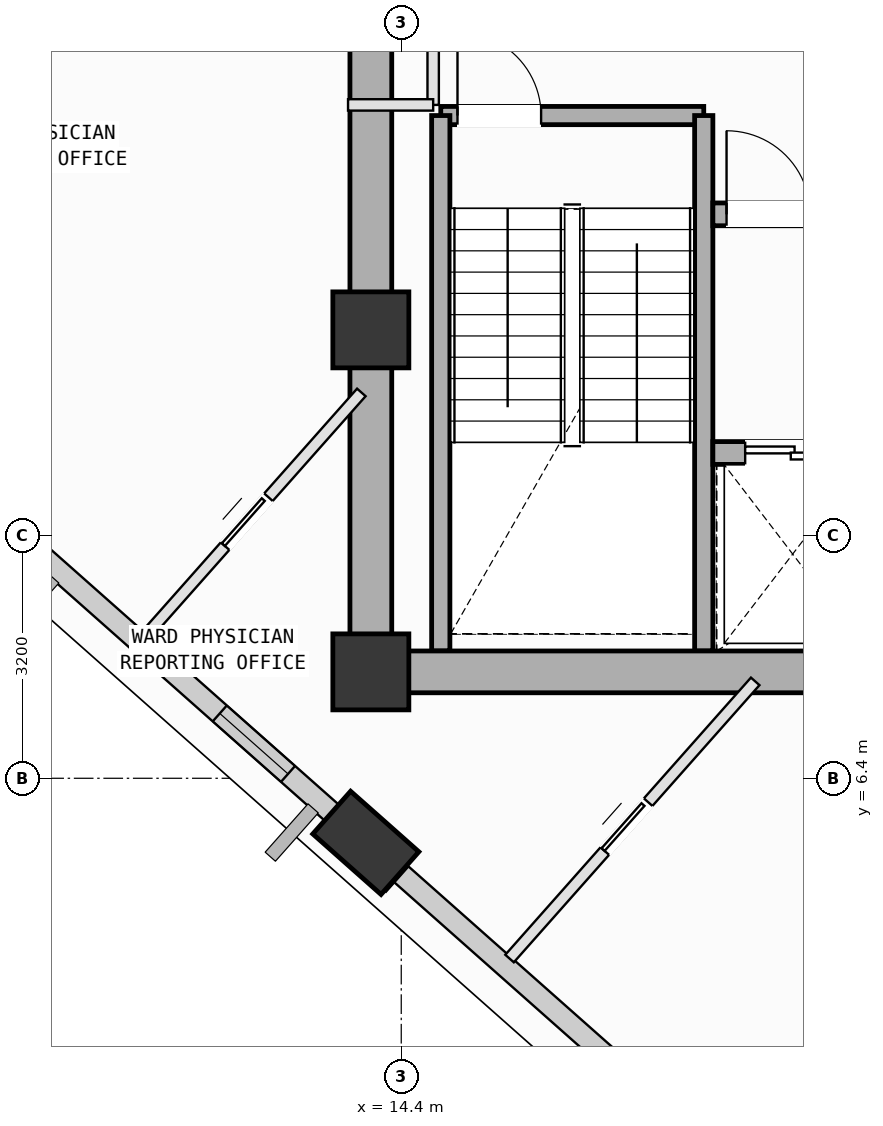
"""IFC4 building model, lengths in metres.
Left out: names, types, materials, properties, quantities, classifications, styles, units other than length and angle.
Written with IfcOpenShell. Run it as: python <this file> out.ifc"""

import sys

from ifc_helpers import new_model, si_unit, direction, frame, frame_2d, origin, origin_2d, place, context, subcontext, project, spatial, rectangle, extrude, element, fill, save


model = new_model("IFC4")
c1 = context("Model", 3, precision=1e-05, world=origin(), true_north=direction((0.0, 1.0)))
c2 = subcontext(c1, "Body", "Model", "MODEL_VIEW")
j1 = project(units=[si_unit("LENGTHUNIT", "METRE"), si_unit("PLANEANGLEUNIT", "RADIAN")], contexts=[c1])
p1 = place(None, origin())
s1 = spatial("IfcSite", under=j1, at=p1, CompositionType="ELEMENT")
p2 = place(p1, origin())
s2 = spatial("IfcBuilding", under=s1, at=p2, CompositionType="ELEMENT")
p3 = place(p2, frame((0.0, 0.0, 231.2)))
s3 = spatial("IfcBuildingStorey", under=s2, at=p3, CompositionType="ELEMENT", Elevation=231.2)
for number, where, z_axis, x_axis in (
    (1, (14.0, 7.8, 0.0), (0.0, 0.0, 1.0), (1.0, 0.0, 0.0)),
    (2, (14.0, 12.3, 0.0), (0.0, 0.0, 1.0), (1.0, 0.0, 0.0)),
):
    element("IfcColumn", number, at=place(p3, frame(where, z_axis=z_axis, x_axis=x_axis)), inside=s3, PredefinedType="COLUMN", context=c2, shape_type="SweptSolid", body=[
        extrude(rectangle(XDim=1.0, YDim=1.0, at=origin_2d()), origin(), (0.0, 0.0, 1.0), 4.0),
    ])
p4 = place(p3, frame((8.957, 9.961, 0.002), z_axis=(0.061875011335, -0.100880533187, 0.992972608382), x_axis=(-0.982288349471, 0.170141650321, 0.078494696129)))
e3 = element("IfcColumn", 3, at=p4, inside=s3, PredefinedType="COLUMN", context=c2, shape_type="SweptSolid", body=[
    extrude(rectangle(XDim=1.2, YDim=0.75, at=origin_2d()), origin(), (0.0, 0.0, 1.0), 4.025),
])
p5 = place(p3, frame((13.934, 5.55, 0.002), z_axis=(0.079998727343, -0.080362909713, 0.993550203244), x_axis=(-0.995303672249, -0.060942288648, 0.075210620677)))
e4 = element("IfcColumn", 4, at=p5, inside=s3, PredefinedType="COLUMN", context=c2, shape_type="SweptSolid", body=[
    extrude(rectangle(XDim=1.2, YDim=0.75, at=origin_2d()), origin(), (0.0, 0.0, 1.0), 4.022),
])
p6 = place(p3, frame((13.807, 5.663, 0.0), z_axis=(0.0, 0.0, 1.0), x_axis=(-0.74835774787, 0.663295319751, 0.0)))
e5 = element("IfcWall", 5, at=p6, inside=s3, PredefinedType="SOLIDWALL", context=c2, shape_type="SweptSolid", body=[
    extrude(rectangle(XDim=5.861, YDim=0.28, at=frame_2d((2.93, 0.0))), origin(), (0.0, 0.0, 1.0), 3.165),
])
p7 = place(p6, frame((1.198, 0.0, 0.75)))
e6 = element("IfcOpeningElement", 6, at=p7, cuts=e5, PredefinedType="OPENING", context=c2, shape_type="SweptSolid", body=[
    extrude(rectangle(XDim=1.2, YDim=1.75, at=frame_2d((0.6, 0.875))), frame((0.0, 0.15, 0.0), z_axis=(0.0, -1.0, 0.0), x_axis=(1.0, 0.0, 0.0)), (0.0, 0.0, 1.0), 0.3),
])
p8 = place(p3, frame((20.058, 0.123, 0.0), z_axis=(0.0, 0.0, 1.0), x_axis=(-0.748365523049, 0.663286547362, 0.0)))
e7 = element("IfcWall", 7, at=p8, inside=s3, PredefinedType="SOLIDWALL", context=c2, shape_type="SweptSolid", body=[
    extrude(rectangle(XDim=7.558, YDim=0.28, at=frame_2d((3.779, 0.0))), origin(), (0.0, 0.0, 1.0), 3.265),
])
p9 = place(p8, frame((1.975, 0.0, 0.75)))
e8 = element("IfcOpeningElement", 8, at=p9, cuts=e7, PredefinedType="OPENING", context=c2, shape_type="SweptSolid", body=[
    extrude(rectangle(XDim=1.6, YDim=1.95, at=frame_2d((0.8, 0.975))), frame((0.0, 0.15, 0.0), z_axis=(0.0, -1.0, 0.0), x_axis=(1.0, 0.0, 0.0)), (0.0, 0.0, 1.0), 0.3),
])
p10 = place(p3, frame((14.92, 15.12, 0.0), z_axis=(0.0, 0.0, 1.0), x_axis=(1.0, 0.0, 0.0)))
e9 = element("IfcWall", 9, at=p10, inside=s3, PredefinedType="SOLIDWALL", context=c2, shape_type="SweptSolid", body=[
    extrude(rectangle(XDim=3.46, YDim=0.24, at=frame_2d((1.73, 0.0))), origin(), (0.0, 0.0, 1.0), 3.78),
])
p11 = place(p10, frame((0.22, 0.0, 0.0)))
e10 = element("IfcOpeningElement", 10, at=p11, cuts=e9, PredefinedType="OPENING", context=c2, shape_type="SweptSolid", body=[
    extrude(rectangle(XDim=1.1, YDim=2.15, at=frame_2d((0.55, 1.075))), frame((0.0, 0.13, 0.0), z_axis=(0.0, -1.0, 0.0), x_axis=(1.0, 0.0, 0.0)), (0.0, 0.0, 1.0), 0.26),
])
for number, where, z_axis, x_axis in (
    (11, (18.38, 15.12, 0.0), (0.0, 0.0, 1.0), (0.0, -1.0, 0.0)),
    (12, (14.92, 8.075, 0.0), (0.0, 0.0, 1.0), (0.0, 1.0, 0.0)),
):
    element("IfcWall", number, at=place(p3, frame(where, z_axis=z_axis, x_axis=x_axis)), inside=s3, PredefinedType="SOLIDWALL", context=c2, shape_type="SweptSolid", body=[
        extrude(rectangle(XDim=7.045, YDim=0.24, at=frame_2d((3.522, 0.0))), origin(), (0.0, 0.0, 1.0), 3.78),
    ])
p12 = place(p3, frame((14.0, 7.8, 0.0), z_axis=(0.0, 0.0, 1.0), x_axis=(1.0, 0.0, 0.0)))
e13 = element("IfcWall", 13, at=p12, inside=s3, PredefinedType="SHEAR", context=c2, shape_type="SweptSolid", body=[
    extrude(rectangle(XDim=10.8, YDim=0.55, at=frame_2d((5.4, 0.0))), origin(), (0.0, 0.0, 1.0), 3.78),
])
p13 = place(p3, frame((14.0, 16.8, 0.0), z_axis=(0.0, 0.0, 1.0), x_axis=(0.0, -1.0, 0.0)))
e14 = element("IfcWall", 14, at=p13, inside=s3, PredefinedType="SHEAR", context=c2, shape_type="SweptSolid", body=[
    extrude(rectangle(XDim=9.0, YDim=0.55, at=frame_2d((4.5, 0.0))), origin(), (0.0, 0.0, 1.0), 3.78),
])
p14 = place(p3, frame((18.5, 10.68, 0.0), z_axis=(0.0, 0.0, 1.0), x_axis=(1.0, 0.0, 0.0)))
e15 = element("IfcWall", 15, at=p14, inside=s3, PredefinedType="SOLIDWALL", context=c2, shape_type="SweptSolid", body=[
    extrude(rectangle(XDim=5.3, YDim=0.3, at=frame_2d((2.65, 0.0))), origin(), (0.0, 0.0, 1.0), 3.78),
])
p15 = place(p14, frame((4.22, 0.0, 0.0)))
e16 = element("IfcOpeningElement", 16, at=p15, cuts=e15, PredefinedType="OPENING", context=c2, shape_type="SweptSolid", body=[
    extrude(rectangle(XDim=0.86, YDim=2.06, at=frame_2d((0.43, 1.03))), frame((0.0, 0.16, 0.0), z_axis=(0.0, -1.0, 0.0), x_axis=(1.0, 0.0, 0.0)), (0.0, 0.0, 1.0), 0.32),
])
p16 = place(p14, frame((0.425, 0.0, 0.0)))
e17 = element("IfcOpeningElement", 17, at=p16, cuts=e15, PredefinedType="OPENING", context=c2, shape_type="SweptSolid", body=[
    extrude(rectangle(XDim=1.25, YDim=2.18, at=frame_2d((0.625, 1.09))), frame((0.0, 0.16, 0.0), z_axis=(0.0, -1.0, 0.0), x_axis=(1.0, 0.0, 0.0)), (0.0, 0.0, 1.0), 0.32),
])
p17 = place(p14, frame((2.525, 0.0, 0.0)))
e18 = element("IfcOpeningElement", 18, at=p17, cuts=e15, PredefinedType="OPENING", context=c2, shape_type="SweptSolid", body=[
    extrude(rectangle(XDim=1.25, YDim=2.18, at=frame_2d((0.625, 1.09))), frame((0.0, 0.16, 0.0), z_axis=(0.0, -1.0, 0.0), x_axis=(1.0, 0.0, 0.0)), (0.0, 0.0, 1.0), 0.32),
])
p18 = place(p3, frame((18.5, 13.82, 0.0), z_axis=(0.0, 0.0, 1.0), x_axis=(1.0, 0.0, 0.0)))
e19 = element("IfcWall", 19, at=p18, inside=s3, PredefinedType="SOLIDWALL", context=c2, shape_type="SweptSolid", body=[
    extrude(rectangle(XDim=5.3, YDim=0.3, at=frame_2d((2.65, 0.0))), origin(), (0.0, 0.0, 1.0), 3.78),
])
p19 = place(p18, frame((0.18, 0.0, 0.0)))
e20 = element("IfcOpeningElement", 20, at=p19, cuts=e19, PredefinedType="OPENING", context=c2, shape_type="SweptSolid", body=[
    extrude(rectangle(XDim=1.1, YDim=2.15, at=frame_2d((0.55, 1.075))), frame((0.0, 0.16, 0.0), z_axis=(0.0, -1.0, 0.0), x_axis=(1.0, 0.0, 0.0)), (0.0, 0.0, 1.0), 0.32),
])
p20 = place(p3, frame((15.825, 4.028, 0.0), z_axis=(0.0, 0.0, 1.0), x_axis=(0.663237367069, 0.748409109327, 0.0)))
e21 = element("IfcWall", 21, at=p20, inside=s3, PredefinedType="PARTITIONING", context=c2, shape_type="SweptSolid", body=[
    extrude(rectangle(XDim=4.873, YDim=0.15, at=frame_2d((2.437, 0.0))), origin(), (0.0, 0.0, 1.0), 3.78),
])
p21 = place(p20, frame((1.89, 0.0, 0.0)))
e22 = element("IfcOpeningElement", 22, at=p21, cuts=e21, PredefinedType="OPENING", context=c2, shape_type="SweptSolid", body=[
    extrude(rectangle(XDim=0.86, YDim=2.06, at=frame_2d((0.43, 1.03))), frame((0.0, 0.085, 0.0), z_axis=(0.0, -1.0, 0.0), x_axis=(1.0, 0.0, 0.0)), (0.0, 0.0, 1.0), 0.17),
])
p22 = place(p3, frame((14.249, 4.964, 0.0), z_axis=(0.0, 0.0, 1.0), x_axis=(-0.748662236722, 0.662951623655, 0.0)))
e23 = element("IfcWall", 23, at=p22, inside=s3, PredefinedType="PARTITIONING", context=c2, shape_type="SweptSolid", body=[
    extrude(rectangle(XDim=0.795, YDim=0.15, at=frame_2d((0.397, 0.0))), origin(), (0.0, 0.0, 1.0), 3.265),
])
p23 = place(p3, frame((11.035, 8.273, 0.0), z_axis=(0.0, 0.0, 1.0), x_axis=(0.663319126157, 0.748336646754, 0.0)))
e24 = element("IfcWall", 24, at=p23, inside=s3, PredefinedType="PARTITIONING", context=c2, shape_type="SweptSolid", body=[
    extrude(rectangle(XDim=4.282, YDim=0.15, at=frame_2d((2.141, 0.0))), origin(), (0.0, 0.0, 1.0), 3.78),
])
p24 = place(p23, frame((1.579, 0.0, 0.0)))
e25 = element("IfcOpeningElement", 25, at=p24, cuts=e24, PredefinedType="OPENING", context=c2, shape_type="SweptSolid", body=[
    extrude(rectangle(XDim=0.86, YDim=2.06, at=frame_2d((0.43, 1.03))), frame((0.0, 0.085, 0.0), z_axis=(0.0, -1.0, 0.0), x_axis=(1.0, 0.0, 0.0)), (0.0, 0.0, 1.0), 0.17),
])
p25 = place(p3, frame((14.82, 18.2, 0.0), z_axis=(0.0, 0.0, 1.0), x_axis=(0.0, -1.0, 0.0)))
e26 = element("IfcWall", 26, at=p25, inside=s3, PredefinedType="PARTITIONING", context=c2, shape_type="SweptSolid", body=[
    extrude(rectangle(XDim=2.94, YDim=0.15, at=frame_2d((1.47, 0.0))), origin(), (0.0, 0.0, 1.0), 3.78),
])
p26 = place(p3, frame((14.82, 15.26, 0.0), z_axis=(0.0, 0.0, 1.0), x_axis=(-1.0, 0.0, 0.0)))
e27 = element("IfcWall", 27, at=p26, inside=s3, PredefinedType="PARTITIONING", context=c2, shape_type="SweptSolid", body=[
    extrude(rectangle(XDim=1.12, YDim=0.15, at=frame_2d((0.56, 0.0))), origin(), (0.0, 0.0, 1.0), 3.78),
])
p27 = place(p3, frame((3.921, 14.117, 0.0), z_axis=(0.0, 0.0, 1.0), x_axis=(0.663304180291, 0.748349894374, 0.0)))
e28 = element("IfcWall", 28, at=p27, inside=s3, PredefinedType="PARTITIONING", context=c2, shape_type="SweptSolid", body=[
    extrude(rectangle(XDim=13.98, YDim=0.15, at=frame_2d((6.99, 0.0))), origin(), (0.0, 0.0, 1.0), 3.78),
])
p28 = place(p7, origin())
e29 = element("IfcWindow", 29, at=p28, inside=s3, PartitioningType="SINGLE_PANEL", PredefinedType="WINDOW", context=c2, shape_type="SweptSolid", body=[
    extrude(rectangle(XDim=1.2, YDim=1.75, at=frame_2d((0.6, 0.875))), frame((0.0, 0.03, 0.0), z_axis=(0.0, -1.0, 0.0), x_axis=(1.0, 0.0, 0.0)), (0.0, 0.0, 1.0), 0.06),
])
fill(e6, e29)
p29 = place(p11, origin())
e30 = element("IfcDoor", 30, at=p29, inside=s3, OperationType="SINGLE_SWING_LEFT", PredefinedType="DOOR", context=c2, shape_type="SweptSolid", body=[
    extrude(rectangle(XDim=1.1, YDim=2.15, at=frame_2d((0.55, 1.075))), frame((0.0, 0.025, 0.0), z_axis=(0.0, -1.0, 0.0), x_axis=(1.0, 0.0, 0.0)), (0.0, 0.0, 1.0), 0.05),
])
fill(e10, e30)
p30 = place(p19, origin())
e31 = element("IfcDoor", 31, at=p30, inside=s3, OperationType="SINGLE_SWING_LEFT", PredefinedType="DOOR", context=c2, shape_type="SweptSolid", body=[
    extrude(rectangle(XDim=1.1, YDim=2.15, at=frame_2d((0.55, 1.075))), frame((0.0, 0.025, 0.0), z_axis=(0.0, -1.0, 0.0), x_axis=(1.0, 0.0, 0.0)), (0.0, 0.0, 1.0), 0.05),
])
fill(e20, e31)
p31 = place(p16, origin())
e32 = element("IfcDoor", 32, at=p31, inside=s3, OperationType="DOUBLE_DOOR_SLIDING", PredefinedType="DOOR", context=c2, shape_type="SweptSolid", body=[
    extrude(rectangle(XDim=1.25, YDim=2.18, at=frame_2d((0.625, 1.09))), frame((0.0, 0.025, 0.0), z_axis=(0.0, -1.0, 0.0), x_axis=(1.0, 0.0, 0.0)), (0.0, 0.0, 1.0), 0.05),
])
fill(e17, e32)
p32 = place(p24, origin())
e33 = element("IfcDoor", 33, at=p32, inside=s3, OperationType="SLIDING_TO_LEFT", PredefinedType="DOOR", context=c2, shape_type="SweptSolid", body=[
    extrude(rectangle(XDim=0.86, YDim=2.06, at=frame_2d((0.43, 1.03))), frame((0.0, 0.025, 0.0), z_axis=(0.0, -1.0, 0.0), x_axis=(1.0, 0.0, 0.0)), (0.0, 0.0, 1.0), 0.05),
])
fill(e25, e33)
p33 = place(p21, origin())
e34 = element("IfcDoor", 34, at=p33, inside=s3, OperationType="SLIDING_TO_LEFT", PredefinedType="DOOR", context=c2, shape_type="SweptSolid", body=[
    extrude(rectangle(XDim=0.86, YDim=2.06, at=frame_2d((0.43, 1.03))), frame((0.0, 0.025, 0.0), z_axis=(0.0, -1.0, 0.0), x_axis=(1.0, 0.0, 0.0)), (0.0, 0.0, 1.0), 0.05),
])
fill(e22, e34)
save(model, sys.argv[1])
